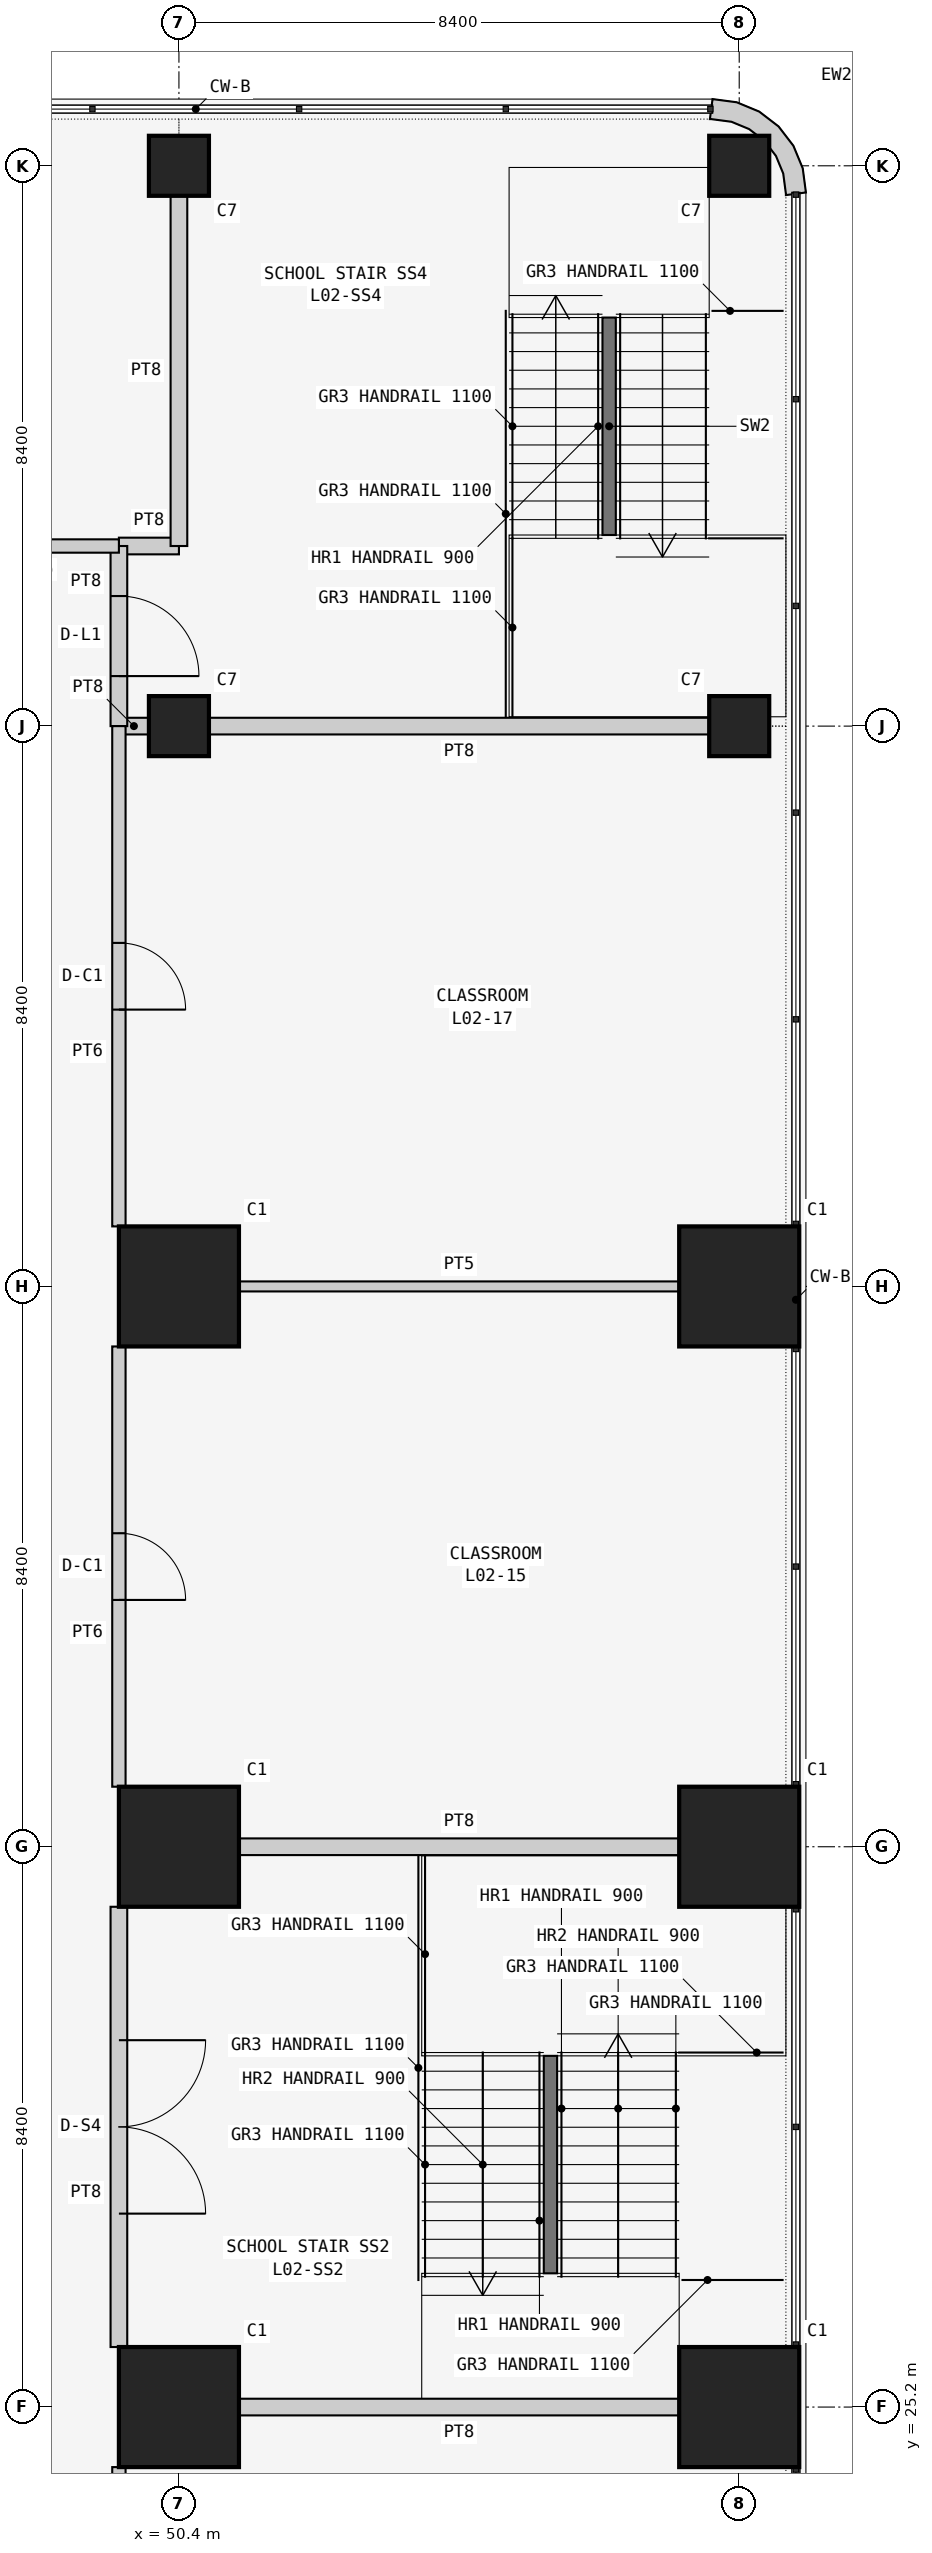
"""IFC4 building model, lengths in metres.
Left out: names, types, materials, properties, quantities, classifications, styles, units other than length and angle.
Written with IfcOpenShell. Run it as: python <this file> out.ifc"""

import sys

from ifc_helpers import new_model, si_unit, direction, frame, frame_2d, origin, origin_2d, place, context, subcontext, project, spatial, polyline, rectangle, outline, extrude, element, fill, save


model = new_model("IFC4")
c1 = context("Model", 3, precision=1e-05, world=origin(), true_north=direction((0.0, 1.0)))
c2 = subcontext(c1, "Body", "Model", "MODEL_VIEW")
j1 = project(units=[si_unit("LENGTHUNIT", "METRE"), si_unit("PLANEANGLEUNIT", "RADIAN")], contexts=[c1])
p1 = place(None, origin())
s1 = spatial("IfcSite", under=j1, at=p1, CompositionType="ELEMENT")
p2 = place(p1, origin())
s2 = spatial("IfcBuilding", under=s1, at=p2, CompositionType="ELEMENT")
p3 = place(p2, frame((0.0, 0.0, 10.5)))
s3 = spatial("IfcBuildingStorey", under=s2, at=p3, CompositionType="ELEMENT", Elevation=10.5)
for number, where, z_axis, x_axis in (
    (1, (50.4, 25.2, 0.0), (0.0, 0.0, 1.0), (1.0, 0.0, 0.0)),
    (2, (50.4, 33.6, 0.0), (0.0, 0.0, 1.0), (1.0, 0.0, 0.0)),
    (3, (50.4, 42.0, 0.0), (0.0, 0.0, 1.0), (1.0, 0.0, 0.0)),
):
    element("IfcColumn", number, at=place(p3, frame(where, z_axis=z_axis, x_axis=x_axis)), inside=s3, PredefinedType="COLUMN", context=c2, shape_type="SweptSolid", body=[
        extrude(rectangle(XDim=1.8, YDim=1.8, at=origin_2d()), origin(), (0.0, 0.0, 1.0), 4.5),
    ])
for number, where, z_axis, x_axis in (
    (4, (50.4, 50.4, 0.0), (0.0, 0.0, 1.0), (1.0, 0.0, 0.0)),
    (5, (50.4, 58.8, 0.0), (0.0, 0.0, 1.0), (1.0, 0.0, 0.0)),
):
    element("IfcColumn", number, at=place(p3, frame(where, z_axis=z_axis, x_axis=x_axis)), inside=s3, PredefinedType="COLUMN", context=c2, shape_type="SweptSolid", body=[
        extrude(rectangle(XDim=0.9, YDim=0.9, at=origin_2d()), origin(), (0.0, 0.0, 1.0), 4.5),
    ])
for number, where, z_axis, x_axis in (
    (6, (58.8, 25.2, 0.0), (0.0, 0.0, 1.0), (1.0, 0.0, 0.0)),
    (7, (58.8, 33.6, 0.0), (0.0, 0.0, 1.0), (1.0, 0.0, 0.0)),
    (8, (58.8, 42.0, 0.0), (0.0, 0.0, 1.0), (1.0, 0.0, 0.0)),
):
    element("IfcColumn", number, at=place(p3, frame(where, z_axis=z_axis, x_axis=x_axis)), inside=s3, PredefinedType="COLUMN", context=c2, shape_type="SweptSolid", body=[
        extrude(rectangle(XDim=1.8, YDim=1.8, at=origin_2d()), origin(), (0.0, 0.0, 1.0), 4.5),
    ])
for number, where, z_axis, x_axis in (
    (9, (58.8, 50.4, 0.0), (0.0, 0.0, 1.0), (1.0, 0.0, 0.0)),
    (10, (58.8, 58.8, 0.0), (0.0, 0.0, 1.0), (1.0, 0.0, 0.0)),
):
    element("IfcColumn", number, at=place(p3, frame(where, z_axis=z_axis, x_axis=x_axis)), inside=s3, PredefinedType="COLUMN", context=c2, shape_type="SweptSolid", body=[
        extrude(rectangle(XDim=0.9, YDim=0.9, at=origin_2d()), origin(), (0.0, 0.0, 1.0), 4.5),
    ])
p4 = place(p3, frame((59.648, 58.355, 0.0), z_axis=(0.0, 0.0, 1.0), x_axis=(0.707106781187, 0.707106781187, 0.0)))
e11 = element("IfcWall", 11, at=p4, inside=s3, PredefinedType="SOLIDWALL", context=c2, shape_type="SweptSolid", body=[
    extrude(outline(polyline([(0.139, 1.904), (-0.101, 1.72), (-0.087, 1.706), (0.1, 1.463), (0.209, 1.198), (0.246, 0.914), (0.209, 0.63), (0.1, 0.365), (-0.087, 0.122), (-0.101, 0.108), (0.139, -0.076), (0.362, 0.214), (0.502, 0.552), (0.549, 0.914), (0.502, 1.276), (0.362, 1.614), (0.139, 1.904)])), origin(), (0.0, 0.0, 1.0), 4.3),
])
for number, where, z_axis, x_axis in (
    (12, (57.9, 25.2, 0.0), (0.0, 0.0, 1.0), (-1.0, 0.0, 0.0)),
    (13, (51.3, 33.6, 0.0), (0.0, 0.0, 1.0), (1.0, 0.0, 0.0)),
):
    element("IfcWall", number, at=place(p3, frame(where, z_axis=z_axis, x_axis=x_axis)), inside=s3, PredefinedType="SOLIDWALL", context=c2, shape_type="SweptSolid", body=[
        extrude(rectangle(XDim=6.6, YDim=0.25, at=frame_2d((3.3, 0.0))), origin(), (0.0, 0.0, 1.0), 3.543),
    ])
p5 = place(p3, frame((49.5, 26.1, 0.0), z_axis=(0.0, 0.0, 1.0), x_axis=(0.0, 1.0, 0.0)))
e14 = element("IfcWall", 14, at=p5, inside=s3, PredefinedType="SOLIDWALL", context=c2, shape_type="SweptSolid", body=[
    extrude(rectangle(XDim=6.6, YDim=0.25, at=frame_2d((3.3, 0.0))), origin(), (0.0, 0.0, 1.0), 4.3),
])
p6 = place(p5, frame((2.0, 0.0, 0.0)))
e15 = element("IfcOpeningElement", 15, at=p6, cuts=e14, PredefinedType="OPENING", context=c2, shape_type="SweptSolid", body=[
    extrude(rectangle(XDim=2.6, YDim=2.4, at=frame_2d((1.3, 1.2))), frame((0.0, 0.135, 0.0), z_axis=(0.0, -1.0, 0.0), x_axis=(1.0, 0.0, 0.0)), (0.0, 0.0, 1.0), 0.27),
])
p7 = place(p3, frame((49.95, 50.4, 0.0), z_axis=(0.0, 0.0, 1.0), x_axis=(-1.0, 0.0, 0.0)))
e16 = element("IfcWall", 16, at=p7, inside=s3, PredefinedType="SOLIDWALL", context=c2, shape_type="SweptSolid", body=[
    extrude(rectangle(XDim=0.45, YDim=0.25, at=frame_2d((0.225, 0.0))), origin(), (0.0, 0.0, 1.0), 3.543),
])
p8 = place(p3, frame((58.35, 50.4, 0.0), z_axis=(0.0, 0.0, 1.0), x_axis=(-1.0, 0.0, 0.0)))
e17 = element("IfcWall", 17, at=p8, inside=s3, PredefinedType="SOLIDWALL", context=c2, shape_type="SweptSolid", body=[
    extrude(rectangle(XDim=7.5, YDim=0.25, at=frame_2d((3.75, 0.0))), origin(), (0.0, 0.0, 1.0), 3.543),
])
p9 = place(p3, frame((49.5, 53.1, 0.0), z_axis=(0.0, 0.0, 1.0), x_axis=(1.0, 0.0, 0.0)))
e18 = element("IfcWall", 18, at=p9, inside=s3, PredefinedType="SOLIDWALL", context=c2, shape_type="SweptSolid", body=[
    extrude(rectangle(XDim=0.9, YDim=0.25, at=frame_2d((0.45, 0.0))), origin(), (0.0, 0.0, 1.0), 4.3),
])
p10 = place(p3, frame((50.4, 53.1, 0.0), z_axis=(0.0, 0.0, 1.0), x_axis=(0.0, 1.0, 0.0)))
e19 = element("IfcWall", 19, at=p10, inside=s3, PredefinedType="SOLIDWALL", context=c2, shape_type="SweptSolid", body=[
    extrude(rectangle(XDim=5.25, YDim=0.25, at=frame_2d((2.625, 0.0))), origin(), (0.0, 0.0, 1.0), 3.543),
])
p11 = place(p3, frame((49.5, 50.4, 0.0), z_axis=(0.0, 0.0, 1.0), x_axis=(0.0, 1.0, 0.0)))
e20 = element("IfcWall", 20, at=p11, inside=s3, PredefinedType="SOLIDWALL", context=c2, shape_type="SweptSolid", body=[
    extrude(rectangle(XDim=2.7, YDim=0.25, at=frame_2d((1.35, 0.0))), origin(), (0.0, 0.0, 1.0), 4.3),
])
p12 = place(p11, frame((0.75, 0.0, 0.0)))
e21 = element("IfcOpeningElement", 21, at=p12, cuts=e20, PredefinedType="OPENING", context=c2, shape_type="SweptSolid", body=[
    extrude(rectangle(XDim=1.2, YDim=2.1, at=frame_2d((0.6, 1.05))), frame((0.0, 0.135, 0.0), z_axis=(0.0, -1.0, 0.0), x_axis=(1.0, 0.0, 0.0)), (0.0, 0.0, 1.0), 0.27),
])
p13 = place(p3, frame((49.5, 17.7, 0.0), z_axis=(0.0, 0.0, 1.0), x_axis=(0.0, 1.0, 0.0)))
e22 = element("IfcWall", 22, at=p13, inside=s3, PredefinedType="PARTITIONING", context=c2, shape_type="SweptSolid", body=[
    extrude(rectangle(XDim=6.6, YDim=0.2, at=frame_2d((3.3, 0.0))), origin(), (0.0, 0.0, 1.0), 4.3),
])
p14 = place(p13, frame((2.8, 0.0, 0.0)))
e23 = element("IfcOpeningElement", 23, at=p14, cuts=e22, PredefinedType="OPENING", context=c2, shape_type="SweptSolid", body=[
    extrude(rectangle(XDim=1.0, YDim=2.1, at=frame_2d((0.5, 1.05))), frame((0.0, 0.11, 0.0), z_axis=(0.0, -1.0, 0.0), x_axis=(1.0, 0.0, 0.0)), (0.0, 0.0, 1.0), 0.22),
])
p15 = place(p3, frame((51.3, 42.0, 0.0), z_axis=(0.0, 0.0, 1.0), x_axis=(1.0, 0.0, 0.0)))
e24 = element("IfcWall", 24, at=p15, inside=s3, PredefinedType="PARTITIONING", context=c2, shape_type="SweptSolid", body=[
    extrude(rectangle(XDim=6.6, YDim=0.15, at=frame_2d((3.3, 0.0))), origin(), (0.0, 0.0, 1.0), 3.543),
])
p16 = place(p3, frame((49.5, 34.5, 0.0), z_axis=(0.0, 0.0, 1.0), x_axis=(0.0, 1.0, 0.0)))
e25 = element("IfcWall", 25, at=p16, inside=s3, PredefinedType="PARTITIONING", context=c2, shape_type="SweptSolid", body=[
    extrude(rectangle(XDim=6.6, YDim=0.2, at=frame_2d((3.3, 0.0))), origin(), (0.0, 0.0, 1.0), 4.3),
])
p17 = place(p16, frame((2.8, 0.0, 0.0)))
e26 = element("IfcOpeningElement", 26, at=p17, cuts=e25, PredefinedType="OPENING", context=c2, shape_type="SweptSolid", body=[
    extrude(rectangle(XDim=1.0, YDim=2.1, at=frame_2d((0.5, 1.05))), frame((0.0, 0.11, 0.0), z_axis=(0.0, -1.0, 0.0), x_axis=(1.0, 0.0, 0.0)), (0.0, 0.0, 1.0), 0.22),
])
p18 = place(p3, frame((49.5, 42.9, 0.0), z_axis=(0.0, 0.0, 1.0), x_axis=(0.0, 1.0, 0.0)))
e27 = element("IfcWall", 27, at=p18, inside=s3, PredefinedType="PARTITIONING", context=c2, shape_type="SweptSolid", body=[
    extrude(rectangle(XDim=7.5, YDim=0.2, at=frame_2d((3.75, 0.0))), origin(), (0.0, 0.0, 1.0), 4.3),
])
p19 = place(p18, frame((3.25, 0.0, 0.0)))
e28 = element("IfcOpeningElement", 28, at=p19, cuts=e27, PredefinedType="OPENING", context=c2, shape_type="SweptSolid", body=[
    extrude(rectangle(XDim=1.0, YDim=2.1, at=frame_2d((0.5, 1.05))), frame((0.0, 0.11, 0.0), z_axis=(0.0, -1.0, 0.0), x_axis=(1.0, 0.0, 0.0)), (0.0, 0.0, 1.0), 0.22),
])
p20 = place(p3, frame((49.5, 53.1, 0.0), z_axis=(0.0, 0.0, 1.0), x_axis=(-1.0, 0.0, 0.0)))
e29 = element("IfcWall", 29, at=p20, inside=s3, PredefinedType="PARTITIONING", context=c2, shape_type="SweptSolid", body=[
    extrude(rectangle(XDim=2.4, YDim=0.2, at=frame_2d((1.2, 0.0))), origin(), (0.0, 0.0, 1.0), 4.3),
])
for number, where, z_axis, x_axis in (
    (30, (55.97, 27.205, 0.0), (0.0, 0.0, 1.0), (0.0, 1.0, 0.0)),
    (31, (56.85, 56.525, 0.0), (0.0, 0.0, 1.0), (0.0, -1.0, 0.0)),
):
    element("IfcWall", number, at=place(p3, frame(where, z_axis=z_axis, x_axis=x_axis)), inside=s3, PredefinedType="SOLIDWALL", context=c2, shape_type="SweptSolid", body=[
        extrude(rectangle(XDim=3.26, YDim=0.2, at=frame_2d((1.63, 0.0))), origin(), (0.0, 0.0, 1.0), 4.5),
    ])
p21 = place(p6, frame((2.6, 0.0, 0.0), z_axis=(0.0, 0.0, 1.0), x_axis=(-1.0, 0.0, 0.0)))
e32 = element("IfcDoor", 32, at=p21, inside=s3, OperationType="DOUBLE_DOOR_SINGLE_SWING", PredefinedType="DOOR", context=c2, shape_type="SweptSolid", body=[
    extrude(rectangle(XDim=2.6, YDim=2.4, at=frame_2d((1.3, 1.2))), frame((0.0, 0.025, 0.0), z_axis=(0.0, -1.0, 0.0), x_axis=(1.0, 0.0, 0.0)), (0.0, 0.0, 1.0), 0.05),
])
fill(e15, e32)
p22 = place(p12, frame((1.2, 0.0, 0.0), z_axis=(0.0, 0.0, 1.0), x_axis=(-1.0, 0.0, 0.0)))
e33 = element("IfcDoor", 33, at=p22, inside=s3, OperationType="SINGLE_SWING_RIGHT", PredefinedType="DOOR", context=c2, shape_type="SweptSolid", body=[
    extrude(rectangle(XDim=1.2, YDim=2.1, at=frame_2d((0.6, 1.05))), frame((0.0, 0.025, 0.0), z_axis=(0.0, -1.0, 0.0), x_axis=(1.0, 0.0, 0.0)), (0.0, 0.0, 1.0), 0.05),
])
fill(e21, e33)
p23 = place(p17, frame((1.0, 0.0, 0.0), z_axis=(0.0, 0.0, 1.0), x_axis=(-1.0, 0.0, 0.0)))
e34 = element("IfcDoor", 34, at=p23, inside=s3, OperationType="SINGLE_SWING_RIGHT", PredefinedType="DOOR", context=c2, shape_type="SweptSolid", body=[
    extrude(rectangle(XDim=1.0, YDim=2.1, at=frame_2d((0.5, 1.05))), frame((0.0, 0.025, 0.0), z_axis=(0.0, -1.0, 0.0), x_axis=(1.0, 0.0, 0.0)), (0.0, 0.0, 1.0), 0.05),
])
fill(e26, e34)
p24 = place(p19, frame((1.0, 0.0, 0.0), z_axis=(0.0, 0.0, 1.0), x_axis=(-1.0, 0.0, 0.0)))
e35 = element("IfcDoor", 35, at=p24, inside=s3, OperationType="SINGLE_SWING_RIGHT", PredefinedType="DOOR", context=c2, shape_type="SweptSolid", body=[
    extrude(rectangle(XDim=1.0, YDim=2.1, at=frame_2d((0.5, 1.05))), frame((0.0, 0.025, 0.0), z_axis=(0.0, -1.0, 0.0), x_axis=(1.0, 0.0, 0.0)), (0.0, 0.0, 1.0), 0.05),
])
fill(e28, e35)
save(model, sys.argv[1])
